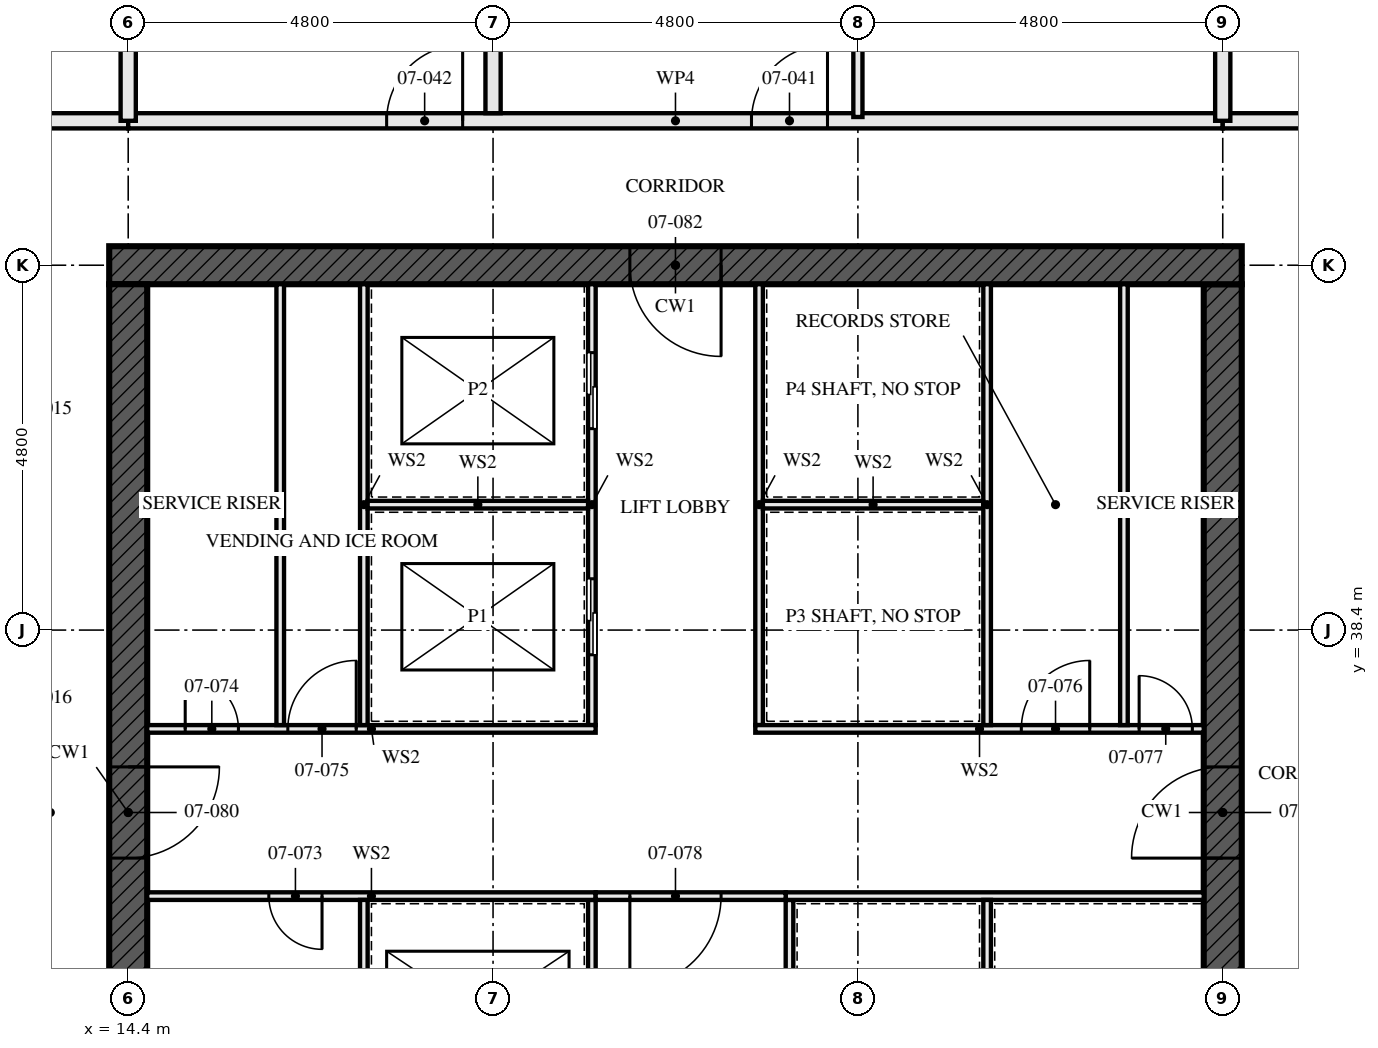
"""IFC4 building model, lengths in metres.
Left out: names, types, materials, properties, quantities, classifications, styles, units other than length and angle.
Written with IfcOpenShell. Run it as: python <this file> out.ifc"""

import sys

from ifc_helpers import new_model, si_unit, direction, frame, frame_2d, origin, place, context, subcontext, project, spatial, rectangle, extrude, element, fill, save


model = new_model("IFC4")
c1 = context("Model", 3, precision=1e-05, world=origin(), true_north=direction((0.0, 1.0)))
c2 = subcontext(c1, "Body", "Model", "MODEL_VIEW")
j1 = project(units=[si_unit("LENGTHUNIT", "METRE"), si_unit("PLANEANGLEUNIT", "RADIAN")], contexts=[c1])
p1 = place(None, origin())
s1 = spatial("IfcSite", under=j1, at=p1, CompositionType="ELEMENT")
p2 = place(p1, origin())
s2 = spatial("IfcBuilding", under=s1, at=p2, CompositionType="ELEMENT")
p3 = place(p2, frame((0.0, 0.0, 30.5)))
s3 = spatial("IfcBuildingStorey", under=s2, at=p3, CompositionType="ELEMENT", Elevation=30.5)
p4 = place(p3, frame((29.05, 43.2, -0.17), z_axis=(0.0, 0.0, 1.0), x_axis=(-1.0, 0.0, 0.0)))
e1 = element("IfcWall", 1, at=p4, inside=s3, PredefinedType="SHEAR", context=c2, shape_type="SweptSolid", body=[
    extrude(rectangle(XDim=14.9, YDim=0.5, at=frame_2d((7.45, 0.0))), origin(), (0.0, 0.0, 1.0), 3.5),
])
p5 = place(p4, frame((6.85, 0.0, 0.17)))
e2 = element("IfcOpeningElement", 2, at=p5, cuts=e1, PredefinedType="OPENING", context=c2, shape_type="SweptSolid", body=[
    extrude(rectangle(XDim=1.2, YDim=2.1, at=frame_2d((0.6, 1.05))), frame((0.0, 0.26, 0.0), z_axis=(0.0, -1.0, 0.0), x_axis=(1.0, 0.0, 0.0)), (0.0, 0.0, 1.0), 0.521),
])
p6 = place(p3, frame((14.4, 42.95, -0.17), z_axis=(0.0, 0.0, 1.0), x_axis=(0.0, -1.0, 0.0)))
e3 = element("IfcWall", 3, at=p6, inside=s3, PredefinedType="SHEAR", context=c2, shape_type="SweptSolid", body=[
    extrude(rectangle(XDim=13.9, YDim=0.5, at=frame_2d((6.95, 0.0))), origin(), (0.0, 0.0, 1.0), 3.5),
])
p7 = place(p6, frame((6.35, 0.0, 0.17)))
e4 = element("IfcOpeningElement", 4, at=p7, cuts=e3, PredefinedType="OPENING", context=c2, shape_type="SweptSolid", body=[
    extrude(rectangle(XDim=1.2, YDim=2.1, at=frame_2d((0.6, 1.05))), frame((0.0, 0.26, 0.0), z_axis=(0.0, -1.0, 0.0), x_axis=(1.0, 0.0, 0.0)), (0.0, 0.0, 1.0), 0.521),
])
p8 = place(p3, frame((28.8, 29.05, -0.17), z_axis=(0.0, 0.0, 1.0), x_axis=(0.0, 1.0, 0.0)))
e5 = element("IfcWall", 5, at=p8, inside=s3, PredefinedType="SHEAR", context=c2, shape_type="SweptSolid", body=[
    extrude(rectangle(XDim=13.9, YDim=0.5, at=frame_2d((6.95, 0.0))), origin(), (0.0, 0.0, 1.0), 3.5),
])
p9 = place(p8, frame((6.35, 0.0, 0.17)))
e6 = element("IfcOpeningElement", 6, at=p9, cuts=e5, PredefinedType="OPENING", context=c2, shape_type="SweptSolid", body=[
    extrude(rectangle(XDim=1.2, YDim=2.1, at=frame_2d((0.6, 1.05))), frame((0.0, 0.26, 0.0), z_axis=(0.0, -1.0, 0.0), x_axis=(1.0, 0.0, 0.0)), (0.0, 0.0, 1.0), 0.521),
])
p10 = place(p3, frame((14.4, 45.1, 0.0), z_axis=(0.0, 0.0, 1.0), x_axis=(-1.0, 0.0, 0.0)))
e7 = element("IfcWall", 7, at=p10, inside=s3, PredefinedType="PARTITIONING", context=c2, shape_type="SweptSolid", body=[
    extrude(rectangle(XDim=9.6, YDim=0.2, at=frame_2d((4.8, 0.0))), origin(), (0.0, 0.0, 1.0), 3.33),
])
p11 = place(p10, frame((5.2, 0.0, 0.0)))
e8 = element("IfcOpeningElement", 8, at=p11, cuts=e7, PredefinedType="OPENING", context=c2, shape_type="SweptSolid", body=[
    extrude(rectangle(XDim=1.0, YDim=2.1, at=frame_2d((0.5, 1.05))), frame((0.0, 0.111, 0.0), z_axis=(0.0, -1.0, 0.0), x_axis=(1.0, 0.0, 0.0)), (0.0, 0.0, 1.0), 0.221),
])
p12 = place(p3, frame((24.0, 51.9, 0.0), z_axis=(0.0, 0.0, 1.0), x_axis=(0.0, -1.0, 0.0)))
e9 = element("IfcWall", 9, at=p12, inside=s3, PredefinedType="PARTITIONING", context=c2, shape_type="SweptSolid", body=[
    extrude(rectangle(XDim=6.75, YDim=0.12, at=frame_2d((3.375, 0.0))), origin(), (0.0, 0.0, 1.0), 2.55),
])
p13 = place(p12, frame((2.925, 0.0, 0.0)))
e10 = element("IfcOpeningElement", 10, at=p13, cuts=e9, PredefinedType="OPENING", context=c2, shape_type="SweptSolid", body=[
    extrude(rectangle(XDim=0.9, YDim=2.1, at=frame_2d((0.45, 1.05))), frame((0.0, 0.071, 0.0), z_axis=(0.0, -1.0, 0.0), x_axis=(1.0, 0.0, 0.0)), (0.0, 0.0, 1.0), 0.141),
])
p14 = place(p3, frame((19.2, 57.255, 0.0), z_axis=(0.0, 0.0, 1.0), x_axis=(0.0, -1.0, 0.0)))
e11 = element("IfcWall", 11, at=p14, inside=s3, PredefinedType="PARTITIONING", context=c2, shape_type="SweptSolid", body=[
    extrude(rectangle(XDim=12.055, YDim=0.2, at=frame_2d((6.027, 0.0))), origin(), (0.0, 0.0, 1.0), 2.55),
])
p15 = place(p3, frame((28.8, 45.1, 0.0), z_axis=(0.0, 0.0, 1.0), x_axis=(-1.0, 0.0, 0.0)))
e12 = element("IfcWall", 12, at=p15, inside=s3, PredefinedType="PARTITIONING", context=c2, shape_type="SweptSolid", body=[
    extrude(rectangle(XDim=14.4, YDim=0.2, at=frame_2d((7.2, 0.0))), origin(), (0.0, 0.0, 1.0), 3.33),
])
p16 = place(p15, frame((5.2, 0.0, 0.0)))
e13 = element("IfcOpeningElement", 13, at=p16, cuts=e12, PredefinedType="OPENING", context=c2, shape_type="SweptSolid", body=[
    extrude(rectangle(XDim=1.0, YDim=2.1, at=frame_2d((0.5, 1.05))), frame((0.0, 0.111, 0.0), z_axis=(0.0, -1.0, 0.0), x_axis=(1.0, 0.0, 0.0)), (0.0, 0.0, 1.0), 0.221),
])
p17 = place(p15, frame((10.0, 0.0, 0.0)))
e14 = element("IfcOpeningElement", 14, at=p17, cuts=e12, PredefinedType="OPENING", context=c2, shape_type="SweptSolid", body=[
    extrude(rectangle(XDim=1.0, YDim=2.1, at=frame_2d((0.5, 1.05))), frame((0.0, 0.111, 0.0), z_axis=(0.0, -1.0, 0.0), x_axis=(1.0, 0.0, 0.0)), (0.0, 0.0, 1.0), 0.221),
])
p18 = place(p3, frame((38.4, 45.1, 0.0), z_axis=(0.0, 0.0, 1.0), x_axis=(-1.0, 0.0, 0.0)))
e15 = element("IfcWall", 15, at=p18, inside=s3, PredefinedType="PARTITIONING", context=c2, shape_type="SweptSolid", body=[
    extrude(rectangle(XDim=9.6, YDim=0.2, at=frame_2d((4.8, 0.0))), origin(), (0.0, 0.0, 1.0), 3.33),
])
p19 = place(p18, frame((0.4, 0.0, 0.0)))
e16 = element("IfcOpeningElement", 16, at=p19, cuts=e15, PredefinedType="OPENING", context=c2, shape_type="SweptSolid", body=[
    extrude(rectangle(XDim=1.0, YDim=2.1, at=frame_2d((0.5, 1.05))), frame((0.0, 0.111, 0.0), z_axis=(0.0, -1.0, 0.0), x_axis=(1.0, 0.0, 0.0)), (0.0, 0.0, 1.0), 0.221),
])
p20 = place(p18, frame((5.2, 0.0, 0.0)))
e17 = element("IfcOpeningElement", 17, at=p20, cuts=e15, PredefinedType="OPENING", context=c2, shape_type="SweptSolid", body=[
    extrude(rectangle(XDim=1.0, YDim=2.1, at=frame_2d((0.5, 1.05))), frame((0.0, 0.111, 0.0), z_axis=(0.0, -1.0, 0.0), x_axis=(1.0, 0.0, 0.0)), (0.0, 0.0, 1.0), 0.221),
])
for number, where, z_axis, x_axis in (
    (18, (16.4, 37.15, 0.0), (0.0, 0.0, 1.0), (0.0, 1.0, 0.0)),
    (19, (27.5, 37.15, 0.0), (0.0, 0.0, 1.0), (0.0, 1.0, 0.0)),
):
    element("IfcWall", number, at=place(p3, frame(where, z_axis=z_axis, x_axis=x_axis)), inside=s3, PredefinedType="SOLIDWALL", context=c2, shape_type="SweptSolid", body=[
        extrude(rectangle(XDim=5.8, YDim=0.1, at=frame_2d((2.9, 0.0))), origin(), (0.0, 0.0, 1.0), 3.33),
    ])
p21 = place(p3, frame((20.5, 29.05, 0.0), z_axis=(0.0, 0.0, 1.0), x_axis=(0.0, 1.0, 0.0)))
e20 = element("IfcWall", 20, at=p21, inside=s3, PredefinedType="SOLIDWALL", context=c2, shape_type="SweptSolid", body=[
    extrude(rectangle(XDim=5.8, YDim=0.1, at=frame_2d((2.9, 0.0))), origin(), (0.0, 0.0, 1.0), 3.33),
])
p22 = place(p21, frame((0.8, 0.0, 0.0)))
e21 = element("IfcOpeningElement", 21, at=p22, cuts=e20, PredefinedType="OPENING", context=c2, shape_type="SweptSolid", body=[
    extrude(rectangle(XDim=1.1, YDim=2.3, at=frame_2d((0.55, 1.15))), frame((0.0, 0.061, 0.0), z_axis=(0.0, -1.0, 0.0), x_axis=(1.0, 0.0, 0.0)), (0.0, 0.0, 1.0), 0.121),
])
p23 = place(p21, frame((3.775, 0.0, 0.0)))
e22 = element("IfcOpeningElement", 22, at=p23, cuts=e20, PredefinedType="OPENING", context=c2, shape_type="SweptSolid", body=[
    extrude(rectangle(XDim=1.1, YDim=2.3, at=frame_2d((0.55, 1.15))), frame((0.0, 0.061, 0.0), z_axis=(0.0, -1.0, 0.0), x_axis=(1.0, 0.0, 0.0)), (0.0, 0.0, 1.0), 0.121),
])
p24 = place(p3, frame((20.5, 37.15, 0.0), z_axis=(0.0, 0.0, 1.0), x_axis=(0.0, 1.0, 0.0)))
e23 = element("IfcWall", 23, at=p24, inside=s3, PredefinedType="SOLIDWALL", context=c2, shape_type="SweptSolid", body=[
    extrude(rectangle(XDim=5.8, YDim=0.1, at=frame_2d((2.9, 0.0))), origin(), (0.0, 0.0, 1.0), 3.33),
])
p25 = place(p24, frame((0.925, 0.0, 0.0)))
e24 = element("IfcOpeningElement", 24, at=p25, cuts=e23, PredefinedType="OPENING", context=c2, shape_type="SweptSolid", body=[
    extrude(rectangle(XDim=1.0, YDim=2.1, at=frame_2d((0.5, 1.05))), frame((0.0, 0.061, 0.0), z_axis=(0.0, -1.0, 0.0), x_axis=(1.0, 0.0, 0.0)), (0.0, 0.0, 1.0), 0.121),
])
p26 = place(p24, frame((3.9, 0.0, 0.0)))
e25 = element("IfcOpeningElement", 25, at=p26, cuts=e23, PredefinedType="OPENING", context=c2, shape_type="SweptSolid", body=[
    extrude(rectangle(XDim=1.0, YDim=2.1, at=frame_2d((0.5, 1.05))), frame((0.0, 0.061, 0.0), z_axis=(0.0, -1.0, 0.0), x_axis=(1.0, 0.0, 0.0)), (0.0, 0.0, 1.0), 0.121),
])
p27 = place(p3, frame((22.7, 37.15, 0.0), z_axis=(0.0, 0.0, 1.0), x_axis=(0.0, 1.0, 0.0)))
e26 = element("IfcWall", 26, at=p27, inside=s3, PredefinedType="SOLIDWALL", context=c2, shape_type="SweptSolid", body=[
    extrude(rectangle(XDim=5.8, YDim=0.1, at=frame_2d((2.9, 0.0))), origin(), (0.0, 0.0, 1.0), 3.33),
])
p28 = place(p3, frame((23.1, 29.05, 0.0), z_axis=(0.0, 0.0, 1.0), x_axis=(0.0, 1.0, 0.0)))
e27 = element("IfcWall", 27, at=p28, inside=s3, PredefinedType="SOLIDWALL", context=c2, shape_type="SweptSolid", body=[
    extrude(rectangle(XDim=5.8, YDim=0.1, at=frame_2d((2.9, 0.0))), origin(), (0.0, 0.0, 1.0), 3.33),
])
p29 = place(p28, frame((1.0, 0.0, 0.0)))
e28 = element("IfcOpeningElement", 28, at=p29, cuts=e27, PredefinedType="OPENING", context=c2, shape_type="SweptSolid", body=[
    extrude(rectangle(XDim=0.7, YDim=2.1, at=frame_2d((0.35, 1.05))), frame((0.0, 0.061, 0.0), z_axis=(0.0, -1.0, 0.0), x_axis=(1.0, 0.0, 0.0)), (0.0, 0.0, 1.0), 0.121),
])
p30 = place(p3, frame((14.65, 34.9, 0.0), z_axis=(0.0, 0.0, 1.0), x_axis=(1.0, 0.0, 0.0)))
e29 = element("IfcWall", 29, at=p30, inside=s3, PredefinedType="SOLIDWALL", context=c2, shape_type="SweptSolid", body=[
    extrude(rectangle(XDim=5.9, YDim=0.1, at=frame_2d((2.95, 0.0))), origin(), (0.0, 0.0, 1.0), 3.33),
])
p31 = place(p30, frame((1.6, 0.0, 0.0)))
e30 = element("IfcOpeningElement", 30, at=p31, cuts=e29, PredefinedType="OPENING", context=c2, shape_type="SweptSolid", body=[
    extrude(rectangle(XDim=0.7, YDim=2.1, at=frame_2d((0.35, 1.05))), frame((0.0, 0.061, 0.0), z_axis=(0.0, -1.0, 0.0), x_axis=(1.0, 0.0, 0.0)), (0.0, 0.0, 1.0), 0.121),
])
p32 = place(p3, frame((23.05, 34.9, 0.0), z_axis=(0.0, 0.0, 1.0), x_axis=(1.0, 0.0, 0.0)))
e31 = element("IfcWall", 31, at=p32, inside=s3, PredefinedType="SOLIDWALL", context=c2, shape_type="SweptSolid", body=[
    extrude(rectangle(XDim=5.5, YDim=0.1, at=frame_2d((2.75, 0.0))), origin(), (0.0, 0.0, 1.0), 3.33),
])
p33 = place(p3, frame((14.65, 37.1, 0.0), z_axis=(0.0, 0.0, 1.0), x_axis=(1.0, 0.0, 0.0)))
e32 = element("IfcWall", 32, at=p33, inside=s3, PredefinedType="SOLIDWALL", context=c2, shape_type="SweptSolid", body=[
    extrude(rectangle(XDim=5.9, YDim=0.1, at=frame_2d((2.95, 0.0))), origin(), (0.0, 0.0, 1.0), 3.33),
])
p34 = place(p33, frame((0.5, 0.0, 0.0)))
e33 = element("IfcOpeningElement", 33, at=p34, cuts=e32, PredefinedType="OPENING", context=c2, shape_type="SweptSolid", body=[
    extrude(rectangle(XDim=0.7, YDim=2.1, at=frame_2d((0.35, 1.05))), frame((0.0, 0.061, 0.0), z_axis=(0.0, -1.0, 0.0), x_axis=(1.0, 0.0, 0.0)), (0.0, 0.0, 1.0), 0.121),
])
p35 = place(p33, frame((1.85, 0.0, 0.0)))
e34 = element("IfcOpeningElement", 34, at=p35, cuts=e32, PredefinedType="OPENING", context=c2, shape_type="SweptSolid", body=[
    extrude(rectangle(XDim=0.9, YDim=2.1, at=frame_2d((0.45, 1.05))), frame((0.0, 0.061, 0.0), z_axis=(0.0, -1.0, 0.0), x_axis=(1.0, 0.0, 0.0)), (0.0, 0.0, 1.0), 0.121),
])
p36 = place(p3, frame((22.65, 37.1, 0.0), z_axis=(0.0, 0.0, 1.0), x_axis=(1.0, 0.0, 0.0)))
e35 = element("IfcWall", 35, at=p36, inside=s3, PredefinedType="SOLIDWALL", context=c2, shape_type="SweptSolid", body=[
    extrude(rectangle(XDim=5.9, YDim=0.1, at=frame_2d((2.95, 0.0))), origin(), (0.0, 0.0, 1.0), 3.33),
])
p37 = place(p36, frame((3.5, 0.0, 0.0)))
e36 = element("IfcOpeningElement", 36, at=p37, cuts=e35, PredefinedType="OPENING", context=c2, shape_type="SweptSolid", body=[
    extrude(rectangle(XDim=0.9, YDim=2.1, at=frame_2d((0.45, 1.05))), frame((0.0, 0.061, 0.0), z_axis=(0.0, -1.0, 0.0), x_axis=(1.0, 0.0, 0.0)), (0.0, 0.0, 1.0), 0.121),
])
p38 = place(p36, frame((5.05, 0.0, 0.0)))
e37 = element("IfcOpeningElement", 37, at=p38, cuts=e35, PredefinedType="OPENING", context=c2, shape_type="SweptSolid", body=[
    extrude(rectangle(XDim=0.7, YDim=2.1, at=frame_2d((0.35, 1.05))), frame((0.0, 0.061, 0.0), z_axis=(0.0, -1.0, 0.0), x_axis=(1.0, 0.0, 0.0)), (0.0, 0.0, 1.0), 0.121),
])
p39 = place(p3, frame((20.55, 34.9, 0.0), z_axis=(0.0, 0.0, 1.0), x_axis=(1.0, 0.0, 0.0)))
e38 = element("IfcWall", 38, at=p39, inside=s3, PredefinedType="SOLIDWALL", context=c2, shape_type="SweptSolid", body=[
    extrude(rectangle(XDim=2.5, YDim=0.1, at=frame_2d((1.25, 0.0))), origin(), (0.0, 0.0, 1.0), 3.33),
])
p40 = place(p39, frame((0.45, 0.0, 0.0)))
e39 = element("IfcOpeningElement", 39, at=p40, cuts=e38, PredefinedType="OPENING", context=c2, shape_type="SweptSolid", body=[
    extrude(rectangle(XDim=1.2, YDim=2.1, at=frame_2d((0.6, 1.05))), frame((0.0, 0.061, 0.0), z_axis=(0.0, -1.0, 0.0), x_axis=(1.0, 0.0, 0.0)), (0.0, 0.0, 1.0), 0.121),
])
for number, where, z_axis, x_axis in (
    (40, (17.5, 29.05, 0.0), (0.0, 0.0, 1.0), (0.0, 1.0, 0.0)),
    (41, (17.5, 37.15, 0.0), (0.0, 0.0, 1.0), (0.0, 1.0, 0.0)),
):
    element("IfcWall", number, at=place(p3, frame(where, z_axis=z_axis, x_axis=x_axis)), inside=s3, PredefinedType="SOLIDWALL", context=c2, shape_type="SweptSolid", body=[
        extrude(rectangle(XDim=5.8, YDim=0.1, at=frame_2d((2.9, 0.0))), origin(), (0.0, 0.0, 1.0), 3.33),
    ])
for number, where, z_axis, x_axis in (
    (42, (17.55, 40.05, 0.0), (0.0, 0.0, 1.0), (1.0, 0.0, 0.0)),
    (43, (22.75, 40.05, 0.0), (0.0, 0.0, 1.0), (1.0, 0.0, 0.0)),
):
    element("IfcWall", number, at=place(p3, frame(where, z_axis=z_axis, x_axis=x_axis)), inside=s3, PredefinedType="SOLIDWALL", context=c2, shape_type="SweptSolid", body=[
        extrude(rectangle(XDim=2.9, YDim=0.1, at=frame_2d((1.45, 0.0))), origin(), (0.0, 0.0, 1.0), 3.33),
    ])
p41 = place(p3, frame((25.7, 37.15, 0.0), z_axis=(0.0, 0.0, 1.0), x_axis=(0.0, 1.0, 0.0)))
e44 = element("IfcWall", 44, at=p41, inside=s3, PredefinedType="SOLIDWALL", context=c2, shape_type="SweptSolid", body=[
    extrude(rectangle(XDim=5.8, YDim=0.1, at=frame_2d((2.9, 0.0))), origin(), (0.0, 0.0, 1.0), 3.33),
])
p42 = place(p3, frame((25.7, 31.95, 0.0), z_axis=(0.0, 0.0, 1.0), x_axis=(0.0, 1.0, 0.0)))
e45 = element("IfcWall", 45, at=p42, inside=s3, PredefinedType="SOLIDWALL", context=c2, shape_type="SweptSolid", body=[
    extrude(rectangle(XDim=2.9, YDim=0.1, at=frame_2d((1.45, 0.0))), origin(), (0.0, 0.0, 1.0), 3.33),
])
for number, where, z_axis, x_axis in (
    (46, (14.4, 45.1, 0.0), (0.0, 0.0, 1.0), (0.0, 1.0, 0.0)),
    (47, (28.8, 45.1, 0.0), (0.0, 0.0, 1.0), (0.0, 1.0, 0.0)),
):
    element("IfcWall", number, at=place(p3, frame(where, z_axis=z_axis, x_axis=x_axis)), inside=s3, PredefinedType="PARTITIONING", context=c2, shape_type="SweptSolid", body=[
        extrude(rectangle(XDim=2.53, YDim=0.2, at=frame_2d((1.265, 0.0))), origin(), (0.0, 0.0, 1.0), 2.32),
    ])
p43 = place(p16, frame((1.0, 0.0, 0.0), z_axis=(0.0, 0.0, 1.0), x_axis=(-1.0, 0.0, 0.0)))
e48 = element("IfcDoor", 48, at=p43, inside=s3, OperationType="SINGLE_SWING_LEFT", PredefinedType="DOOR", context=c2, shape_type="SweptSolid", body=[
    extrude(rectangle(XDim=1.0, YDim=2.1, at=frame_2d((0.5, 1.05))), frame((0.0, 0.027, 0.0), z_axis=(0.0, -1.0, 0.0), x_axis=(1.0, 0.0, 0.0)), (0.0, 0.0, 1.0), 0.054),
])
fill(e13, e48)
p44 = place(p17, frame((1.0, 0.0, 0.0), z_axis=(0.0, 0.0, 1.0), x_axis=(-1.0, 0.0, 0.0)))
e49 = element("IfcDoor", 49, at=p44, inside=s3, OperationType="SINGLE_SWING_LEFT", PredefinedType="DOOR", context=c2, shape_type="SweptSolid", body=[
    extrude(rectangle(XDim=1.0, YDim=2.1, at=frame_2d((0.5, 1.05))), frame((0.0, 0.027, 0.0), z_axis=(0.0, -1.0, 0.0), x_axis=(1.0, 0.0, 0.0)), (0.0, 0.0, 1.0), 0.054),
])
fill(e14, e49)
p45 = place(p25, origin())
e50 = element("IfcDoor", 50, at=p45, inside=s3, OperationType="SLIDING_TO_LEFT", PredefinedType="DOOR", context=c2, shape_type="SweptSolid", body=[
    extrude(rectangle(XDim=1.0, YDim=2.1, at=frame_2d((0.5, 1.05))), frame((0.0, 0.05, 0.0), z_axis=(0.0, -1.0, 0.0), x_axis=(1.0, 0.0, 0.0)), (0.0, 0.0, 1.0), 0.1),
])
fill(e24, e50)
p46 = place(p26, origin())
e51 = element("IfcDoor", 51, at=p46, inside=s3, OperationType="SLIDING_TO_LEFT", PredefinedType="DOOR", context=c2, shape_type="SweptSolid", body=[
    extrude(rectangle(XDim=1.0, YDim=2.1, at=frame_2d((0.5, 1.05))), frame((0.0, 0.05, 0.0), z_axis=(0.0, -1.0, 0.0), x_axis=(1.0, 0.0, 0.0)), (0.0, 0.0, 1.0), 0.1),
])
fill(e25, e51)
p47 = place(p31, frame((0.7, 0.0, 0.0), z_axis=(0.0, 0.0, 1.0), x_axis=(-1.0, 0.0, 0.0)))
e52 = element("IfcDoor", 52, at=p47, inside=s3, OperationType="SINGLE_SWING_RIGHT", PredefinedType="DOOR", context=c2, shape_type="SweptSolid", body=[
    extrude(rectangle(XDim=0.7, YDim=2.1, at=frame_2d((0.35, 1.05))), frame((0.0, 0.027, 0.0), z_axis=(0.0, -1.0, 0.0), x_axis=(1.0, 0.0, 0.0)), (0.0, 0.0, 1.0), 0.054),
])
fill(e30, e52)
p48 = place(p34, origin())
e53 = element("IfcDoor", 53, at=p48, inside=s3, OperationType="SINGLE_SWING_RIGHT", PredefinedType="DOOR", context=c2, shape_type="SweptSolid", body=[
    extrude(rectangle(XDim=0.7, YDim=2.1, at=frame_2d((0.35, 1.05))), frame((0.0, 0.027, 0.0), z_axis=(0.0, -1.0, 0.0), x_axis=(1.0, 0.0, 0.0)), (0.0, 0.0, 1.0), 0.054),
])
fill(e33, e53)
p49 = place(p35, origin())
e54 = element("IfcDoor", 54, at=p49, inside=s3, OperationType="SINGLE_SWING_LEFT", PredefinedType="DOOR", context=c2, shape_type="SweptSolid", body=[
    extrude(rectangle(XDim=0.9, YDim=2.1, at=frame_2d((0.45, 1.05))), frame((0.0, 0.027, 0.0), z_axis=(0.0, -1.0, 0.0), x_axis=(1.0, 0.0, 0.0)), (0.0, 0.0, 1.0), 0.054),
])
fill(e34, e54)
p50 = place(p37, origin())
e55 = element("IfcDoor", 55, at=p50, inside=s3, OperationType="SINGLE_SWING_LEFT", PredefinedType="DOOR", context=c2, shape_type="SweptSolid", body=[
    extrude(rectangle(XDim=0.9, YDim=2.1, at=frame_2d((0.45, 1.05))), frame((0.0, 0.027, 0.0), z_axis=(0.0, -1.0, 0.0), x_axis=(1.0, 0.0, 0.0)), (0.0, 0.0, 1.0), 0.054),
])
fill(e36, e55)
p51 = place(p38, origin())
e56 = element("IfcDoor", 56, at=p51, inside=s3, OperationType="SINGLE_SWING_RIGHT", PredefinedType="DOOR", context=c2, shape_type="SweptSolid", body=[
    extrude(rectangle(XDim=0.7, YDim=2.1, at=frame_2d((0.35, 1.05))), frame((0.0, 0.027, 0.0), z_axis=(0.0, -1.0, 0.0), x_axis=(1.0, 0.0, 0.0)), (0.0, 0.0, 1.0), 0.054),
])
fill(e37, e56)
p52 = place(p40, frame((1.2, 0.0, 0.0), z_axis=(0.0, 0.0, 1.0), x_axis=(-1.0, 0.0, 0.0)))
e57 = element("IfcDoor", 57, at=p52, inside=s3, OperationType="SINGLE_SWING_LEFT", PredefinedType="DOOR", context=c2, shape_type="SweptSolid", body=[
    extrude(rectangle(XDim=1.2, YDim=2.1, at=frame_2d((0.6, 1.05))), frame((0.0, 0.027, 0.0), z_axis=(0.0, -1.0, 0.0), x_axis=(1.0, 0.0, 0.0)), (0.0, 0.0, 1.0), 0.054),
])
fill(e39, e57)
p53 = place(p7, origin())
e58 = element("IfcDoor", 58, at=p53, inside=s3, OperationType="SINGLE_SWING_LEFT", PredefinedType="DOOR", context=c2, shape_type="SweptSolid", body=[
    extrude(rectangle(XDim=1.2, YDim=2.1, at=frame_2d((0.6, 1.05))), frame((0.0, 0.027, 0.0), z_axis=(0.0, -1.0, 0.0), x_axis=(1.0, 0.0, 0.0)), (0.0, 0.0, 1.0), 0.054),
])
fill(e4, e58)
p54 = place(p9, origin())
e59 = element("IfcDoor", 59, at=p54, inside=s3, OperationType="SINGLE_SWING_LEFT", PredefinedType="DOOR", context=c2, shape_type="SweptSolid", body=[
    extrude(rectangle(XDim=1.2, YDim=2.1, at=frame_2d((0.6, 1.05))), frame((0.0, 0.027, 0.0), z_axis=(0.0, -1.0, 0.0), x_axis=(1.0, 0.0, 0.0)), (0.0, 0.0, 1.0), 0.054),
])
fill(e6, e59)
p55 = place(p5, origin())
e60 = element("IfcDoor", 60, at=p55, inside=s3, OperationType="SINGLE_SWING_LEFT", PredefinedType="DOOR", context=c2, shape_type="SweptSolid", body=[
    extrude(rectangle(XDim=1.2, YDim=2.1, at=frame_2d((0.6, 1.05))), frame((0.0, 0.027, 0.0), z_axis=(0.0, -1.0, 0.0), x_axis=(1.0, 0.0, 0.0)), (0.0, 0.0, 1.0), 0.054),
])
fill(e2, e60)
save(model, sys.argv[1])
